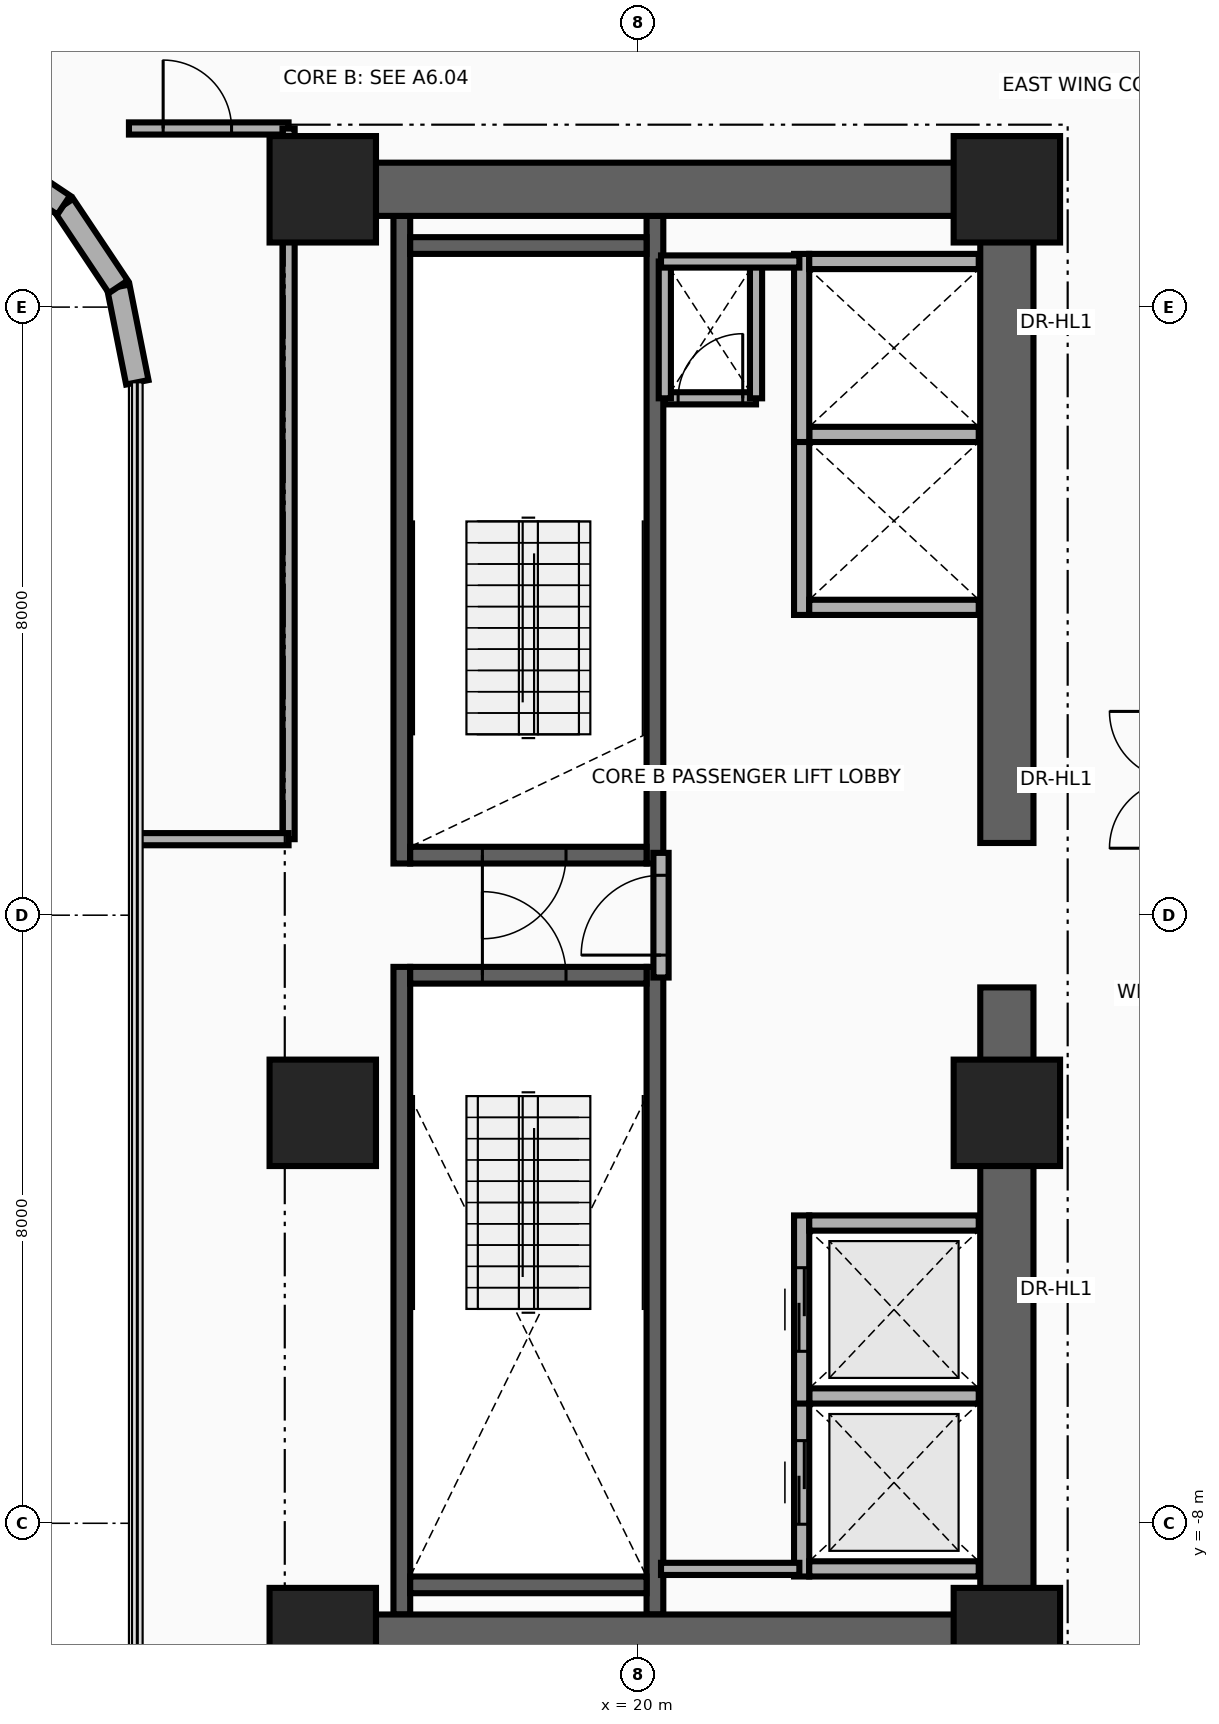
"""IFC4 building model, lengths in metres.
Left out: names, types, materials, properties, quantities, classifications, styles, units other than length and angle.
Written with IfcOpenShell. Run it as: python <this file> out.ifc"""

import sys

from ifc_helpers import new_model, si_unit, direction, frame, frame_2d, origin, origin_2d, place, context, subcontext, project, spatial, rectangle, extrude, source, transform, mapped, element, fill, save


model = new_model("IFC4")
c1 = context("Model", 3, precision=1e-05, world=origin(), true_north=direction((0.0, 1.0)))
c2 = subcontext(c1, "Body", "Model", "MODEL_VIEW")
j1 = project(units=[si_unit("LENGTHUNIT", "METRE"), si_unit("PLANEANGLEUNIT", "RADIAN")], contexts=[c1])
p1 = place(None, origin())
s1 = spatial("IfcSite", under=j1, at=p1, CompositionType="ELEMENT")
p2 = place(p1, origin())
s2 = spatial("IfcBuilding", under=s1, at=p2, CompositionType="ELEMENT")
p3 = place(p2, frame((0.0, 0.0, 44.5)))
s3 = spatial("IfcBuildingStorey", under=s2, at=p3, CompositionType="ELEMENT", Elevation=44.5)
for number, where, z_axis, x_axis in (
    (1, (16.89, 0.68, 0.0), (0.0, 0.0, 1.0), (0.0, 1.0, 0.0)),
    (2, (20.22, 0.68, 0.0), (0.0, 0.0, 1.0), (0.0, 1.0, 0.0)),
):
    element("IfcWall", number, at=place(p3, frame(where, z_axis=z_axis, x_axis=x_axis)), inside=s3, PredefinedType="SHEAR", context=c2, shape_type="SweptSolid", body=[
        extrude(rectangle(XDim=8.52, YDim=0.22, at=frame_2d((4.26, 0.0))), origin(), (0.0, 0.0, 1.0), 3.46),
    ])
p4 = place(p3, frame((17.0, 0.79, 0.0), z_axis=(0.0, 0.0, 1.0), x_axis=(1.0, 0.0, 0.0)))
e3 = element("IfcWall", 3, at=p4, inside=s3, PredefinedType="SHEAR", context=c2, shape_type="SweptSolid", body=[
    extrude(rectangle(XDim=3.11, YDim=0.22, at=frame_2d((1.555, 0.0))), origin(), (0.0, 0.0, 1.0), 3.46),
])
p5 = place(p4, frame((0.95, 0.0, 0.0)))
e4 = element("IfcOpeningElement", 4, at=p5, cuts=e3, PredefinedType="OPENING", context=c2, shape_type="SweptSolid", body=[
    extrude(rectangle(XDim=1.1, YDim=2.15, at=frame_2d((0.55, 1.075))), frame((0.0, 0.125, 0.0), z_axis=(0.0, -1.0, 0.0), x_axis=(1.0, 0.0, 0.0)), (0.0, 0.0, 1.0), 0.25),
])
p6 = place(p3, frame((17.0, 8.81, 0.0), z_axis=(0.0, 0.0, 1.0), x_axis=(1.0, 0.0, 0.0)))
e5 = element("IfcWall", 5, at=p6, inside=s3, PredefinedType="SHEAR", context=c2, shape_type="SweptSolid", body=[
    extrude(rectangle(XDim=3.11, YDim=0.22, at=frame_2d((1.555, 0.0))), origin(), (0.0, 0.0, 1.0), 3.46),
])
for number, where, z_axis, x_axis in (
    (6, (16.89, -9.2, 0.0), (0.0, 0.0, 1.0), (0.0, 1.0, 0.0)),
    (7, (20.22, -9.2, 0.0), (0.0, 0.0, 1.0), (0.0, 1.0, 0.0)),
):
    element("IfcWall", number, at=place(p3, frame(where, z_axis=z_axis, x_axis=x_axis)), inside=s3, PredefinedType="SHEAR", context=c2, shape_type="SweptSolid", body=[
        extrude(rectangle(XDim=8.52, YDim=0.22, at=frame_2d((4.26, 0.0))), origin(), (0.0, 0.0, 1.0), 3.46),
    ])
p7 = place(p3, frame((17.0, -8.81, 0.0), z_axis=(0.0, 0.0, 1.0), x_axis=(1.0, 0.0, 0.0)))
e8 = element("IfcWall", 8, at=p7, inside=s3, PredefinedType="SHEAR", context=c2, shape_type="SweptSolid", body=[
    extrude(rectangle(XDim=3.11, YDim=0.22, at=frame_2d((1.555, 0.0))), origin(), (0.0, 0.0, 1.0), 3.46),
])
p8 = place(p3, frame((17.0, -0.79, 0.0), z_axis=(0.0, 0.0, 1.0), x_axis=(1.0, 0.0, 0.0)))
e9 = element("IfcWall", 9, at=p8, inside=s3, PredefinedType="SHEAR", context=c2, shape_type="SweptSolid", body=[
    extrude(rectangle(XDim=3.11, YDim=0.22, at=frame_2d((1.555, 0.0))), origin(), (0.0, 0.0, 1.0), 3.46),
])
p9 = place(p8, frame((0.95, 0.0, 0.0)))
e10 = element("IfcOpeningElement", 10, at=p9, cuts=e9, PredefinedType="OPENING", context=c2, shape_type="SweptSolid", body=[
    extrude(rectangle(XDim=1.1, YDim=2.15, at=frame_2d((0.55, 1.075))), frame((0.0, 0.125, 0.0), z_axis=(0.0, -1.0, 0.0), x_axis=(1.0, 0.0, 0.0)), (0.0, 0.0, 1.0), 0.25),
])
for number, where, z_axis, x_axis in (
    (11, (24.85, -9.9, 0.0), (0.0, 0.0, 1.0), (0.0, 1.0, 0.0)),
    (12, (24.85, 0.95, 0.0), (0.0, 0.0, 1.0), (0.0, 1.0, 0.0)),
):
    element("IfcWall", number, at=place(p3, frame(where, z_axis=z_axis, x_axis=x_axis)), inside=s3, PredefinedType="SHEAR", context=c2, shape_type="SweptSolid", body=[
        extrude(rectangle(XDim=8.95, YDim=0.7, at=frame_2d((4.475, 0.0))), origin(), (0.0, 0.0, 1.0), 3.46),
    ])
for number, where, z_axis, x_axis in (
    (13, (15.85, 9.55, 0.0), (0.0, 0.0, 1.0), (1.0, 0.0, 0.0)),
    (14, (15.85, -9.55, 0.0), (0.0, 0.0, 1.0), (1.0, 0.0, 0.0)),
):
    element("IfcWall", number, at=place(p3, frame(where, z_axis=z_axis, x_axis=x_axis)), inside=s3, PredefinedType="SHEAR", context=c2, shape_type="SweptSolid", body=[
        extrude(rectangle(XDim=9.0, YDim=0.7, at=frame_2d((4.5, 0.0))), origin(), (0.0, 0.0, 1.0), 3.46),
    ])
m1 = source(origin(), c2, "Body", "SweptSolid", [
    extrude(rectangle(XDim=1.4, YDim=1.4, at=origin_2d()), origin(), (0.0, 0.0, 1.0), 3.7),
])
for number, where, z_axis, x_axis in (
    (15, (15.85, -9.55, 0.0), (0.0, 0.0, 1.0), (1.0, 0.0, 0.0)),
    (16, (24.85, -9.55, 0.0), (0.0, 0.0, 1.0), (1.0, 0.0, 0.0)),
    (17, (15.85, -2.6, 0.0), (0.0, 0.0, 1.0), (1.0, 0.0, 0.0)),
    (18, (24.85, -2.6, 0.0), (0.0, 0.0, 1.0), (1.0, 0.0, 0.0)),
    (19, (15.85, 9.55, 0.0), (0.0, 0.0, 1.0), (1.0, 0.0, 0.0)),
    (20, (24.85, 9.55, 0.0), (0.0, 0.0, 1.0), (1.0, 0.0, 0.0)),
):
    element("IfcColumn", number, at=place(p3, frame(where, z_axis=z_axis, x_axis=x_axis)), inside=s3, PredefinedType="COLUMN", context=c2, shape_type="MappedRepresentation", body=[
        mapped(m1, transform((0.0, 0.0, 0.0), x_axis=(1.0, 0.0, 0.0), y_axis=(0.0, 1.0, 0.0), z_axis=(0.0, 0.0, 1.0), scale=1.0)),
    ])
p10 = place(p3, frame((13.41, 7.011, 0.0), z_axis=(0.0, 0.0, 1.0), x_axis=(-0.195090163074, 0.980785312019, 0.0)))
e21 = element("IfcWall", 21, at=p10, inside=s3, PredefinedType="SOLIDWALL", context=c2, shape_type="SweptSolid", body=[
    extrude(rectangle(XDim=1.281, YDim=0.3, at=frame_2d((0.641, 0.0))), origin(), (0.0, 0.0, 1.0), 3.46),
])
for number, where, z_axis, x_axis in (
    (22, (13.16, 8.268, 0.0), (0.0, 0.0, 1.0), (-0.556, 0.831, 0.0)),
    (23, (12.442, 9.342, 0.0), (0.0, 0.0, 1.0), (-0.831, 0.556, 0.0)),
):
    element("IfcWall", number, at=place(p3, frame(where, z_axis=z_axis, x_axis=x_axis)), inside=s3, PredefinedType="SOLIDWALL", context=c2, shape_type="SweptSolid", body=[
        extrude(rectangle(XDim=1.292, YDim=0.3, at=frame_2d((0.646, 0.0))), origin(), (0.0, 0.0, 1.0), 3.46),
    ])
p11 = place(p3, frame((22.15, -8.7, 0.0), z_axis=(0.0, 0.0, 1.0), x_axis=(0.0, 1.0, 0.0)))
e24 = element("IfcWall", 24, at=p11, inside=s3, PredefinedType="MOVABLE", context=c2, shape_type="SweptSolid", body=[
    extrude(rectangle(XDim=2.475, YDim=0.2, at=frame_2d((1.237, 0.0))), origin(), (0.0, 0.0, 1.0), 3.46),
])
p12 = place(p11, frame((0.688, 0.0, 0.0)))
e25 = element("IfcOpeningElement", 25, at=p12, cuts=e24, PredefinedType="OPENING", context=c2, shape_type="SweptSolid", body=[
    extrude(rectangle(XDim=1.1, YDim=2.1, at=frame_2d((0.55, 1.05))), frame((0.0, 0.115, 0.0), z_axis=(0.0, -1.0, 0.0), x_axis=(1.0, 0.0, 0.0)), (0.0, 0.0, 1.0), 0.23),
])
for number, where, z_axis, x_axis in (
    (26, (22.25, -8.6, 0.0), (0.0, 0.0, 1.0), (1.0, 0.0, 0.0)),
    (27, (22.25, -6.325, 0.0), (0.0, 0.0, 1.0), (1.0, 0.0, 0.0)),
):
    element("IfcWall", number, at=place(p3, frame(where, z_axis=z_axis, x_axis=x_axis)), inside=s3, PredefinedType="MOVABLE", context=c2, shape_type="SweptSolid", body=[
        extrude(rectangle(XDim=2.23, YDim=0.2, at=frame_2d((1.115, 0.0))), origin(), (0.0, 0.0, 1.0), 3.46),
    ])
p13 = place(p3, frame((22.15, -6.425, 0.0), z_axis=(0.0, 0.0, 1.0), x_axis=(0.0, 1.0, 0.0)))
e28 = element("IfcWall", 28, at=p13, inside=s3, PredefinedType="MOVABLE", context=c2, shape_type="SweptSolid", body=[
    extrude(rectangle(XDim=2.475, YDim=0.2, at=frame_2d((1.238, 0.0))), origin(), (0.0, 0.0, 1.0), 3.46),
])
p14 = place(p13, frame((0.688, 0.0, 0.0)))
e29 = element("IfcOpeningElement", 29, at=p14, cuts=e28, PredefinedType="OPENING", context=c2, shape_type="SweptSolid", body=[
    extrude(rectangle(XDim=1.1, YDim=2.1, at=frame_2d((0.55, 1.05))), frame((0.0, 0.115, 0.0), z_axis=(0.0, -1.0, 0.0), x_axis=(1.0, 0.0, 0.0)), (0.0, 0.0, 1.0), 0.23),
])
p15 = place(p3, frame((22.25, -4.05, 0.0), z_axis=(0.0, 0.0, 1.0), x_axis=(1.0, 0.0, 0.0)))
e30 = element("IfcWall", 30, at=p15, inside=s3, PredefinedType="MOVABLE", context=c2, shape_type="SweptSolid", body=[
    extrude(rectangle(XDim=2.23, YDim=0.2, at=frame_2d((1.115, 0.0))), origin(), (0.0, 0.0, 1.0), 3.46),
])
p16 = place(p3, frame((22.15, 3.95, 0.0), z_axis=(0.0, 0.0, 1.0), x_axis=(0.0, 1.0, 0.0)))
e31 = element("IfcWall", 31, at=p16, inside=s3, PredefinedType="MOVABLE", context=c2, shape_type="SweptSolid", body=[
    extrude(rectangle(XDim=2.475, YDim=0.2, at=frame_2d((1.238, 0.0))), origin(), (0.0, 0.0, 1.0), 3.46),
])
for number, where, z_axis, x_axis in (
    (32, (22.25, 4.05, 0.0), (0.0, 0.0, 1.0), (1.0, 0.0, 0.0)),
    (33, (22.25, 6.325, 0.0), (0.0, 0.0, 1.0), (1.0, 0.0, 0.0)),
):
    element("IfcWall", number, at=place(p3, frame(where, z_axis=z_axis, x_axis=x_axis)), inside=s3, PredefinedType="MOVABLE", context=c2, shape_type="SweptSolid", body=[
        extrude(rectangle(XDim=2.23, YDim=0.2, at=frame_2d((1.115, 0.0))), origin(), (0.0, 0.0, 1.0), 2.245),
    ])
p17 = place(p3, frame((22.15, 6.225, 0.0), z_axis=(0.0, 0.0, 1.0), x_axis=(0.0, 1.0, 0.0)))
e34 = element("IfcWall", 34, at=p17, inside=s3, PredefinedType="MOVABLE", context=c2, shape_type="SweptSolid", body=[
    extrude(rectangle(XDim=2.475, YDim=0.2, at=frame_2d((1.237, 0.0))), origin(), (0.0, 0.0, 1.0), 3.46),
])
p18 = place(p3, frame((22.25, 8.6, 0.0), z_axis=(0.0, 0.0, 1.0), x_axis=(1.0, 0.0, 0.0)))
e35 = element("IfcWall", 35, at=p18, inside=s3, PredefinedType="MOVABLE", context=c2, shape_type="SweptSolid", body=[
    extrude(rectangle(XDim=2.23, YDim=0.2, at=frame_2d((1.115, 0.0))), origin(), (0.0, 0.0, 1.0), 2.245),
])
p19 = place(p3, frame((20.3, -0.82, 0.0), z_axis=(0.0, 0.0, 1.0), x_axis=(0.0, 1.0, 0.0)))
e36 = element("IfcWall", 36, at=p19, inside=s3, PredefinedType="PARTITIONING", context=c2, shape_type="SweptSolid", body=[
    extrude(rectangle(XDim=1.64, YDim=0.2, at=frame_2d((0.82, 0.0))), origin(), (0.0, 0.0, 1.0), 3.46),
])
p20 = place(p19, frame((0.295, 0.0, 0.0)))
e37 = element("IfcOpeningElement", 37, at=p20, cuts=e36, PredefinedType="OPENING", context=c2, shape_type="SweptSolid", body=[
    extrude(rectangle(XDim=1.05, YDim=2.15, at=frame_2d((0.525, 1.075))), frame((0.0, 0.115, 0.0), z_axis=(0.0, -1.0, 0.0), x_axis=(1.0, 0.0, 0.0)), (0.0, 0.0, 1.0), 0.23),
])
p21 = place(p3, frame((20.35, 6.8, 0.0), z_axis=(0.0, 0.0, 1.0), x_axis=(1.0, 0.0, 0.0)))
e38 = element("IfcWall", 38, at=p21, inside=s3, PredefinedType="PARTITIONING", context=c2, shape_type="SweptSolid", body=[
    extrude(rectangle(XDim=1.2, YDim=0.16, at=frame_2d((0.6, 0.0))), origin(), (0.0, 0.0, 1.0), 3.46),
])
p22 = place(p21, frame((0.175, 0.0, 0.0)))
e39 = element("IfcOpeningElement", 39, at=p22, cuts=e38, PredefinedType="OPENING", context=c2, shape_type="SweptSolid", body=[
    extrude(rectangle(XDim=0.85, YDim=2.05, at=frame_2d((0.425, 1.025))), frame((0.0, 0.095, 0.0), z_axis=(0.0, -1.0, 0.0), x_axis=(1.0, 0.0, 0.0)), (0.0, 0.0, 1.0), 0.19),
])
for number, where, z_axis, x_axis in (
    (40, (21.55, 6.8, 0.0), (0.0, 0.0, 1.0), (0.0, 1.0, 0.0)),
    (41, (20.35, 6.8, 0.0), (0.0, 0.0, 1.0), (0.0, 1.0, 0.0)),
):
    element("IfcWall", number, at=place(p3, frame(where, z_axis=z_axis, x_axis=x_axis)), inside=s3, PredefinedType="PARTITIONING", context=c2, shape_type="SweptSolid", body=[
        extrude(rectangle(XDim=1.8, YDim=0.16, at=frame_2d((0.9, 0.0))), origin(), (0.0, 0.0, 1.0), 3.46),
    ])
for number, where, z_axis, x_axis in (
    (42, (20.3, -8.6, 0.0), (0.0, 0.0, 1.0), (1.0, 0.0, 0.0)),
    (43, (20.3, 8.6, 0.0), (0.0, 0.0, 1.0), (1.0, 0.0, 0.0)),
):
    element("IfcWall", number, at=place(p3, frame(where, z_axis=z_axis, x_axis=x_axis)), inside=s3, PredefinedType="PARTITIONING", context=c2, shape_type="SweptSolid", body=[
        extrude(rectangle(XDim=1.82, YDim=0.16, at=frame_2d((0.91, 0.0))), origin(), (0.0, 0.0, 1.0), 3.46),
    ])
p23 = place(p3, frame((13.3, 10.35, 0.0), z_axis=(0.0, 0.0, 1.0), x_axis=(1.0, 0.0, 0.0)))
e44 = element("IfcWall", 44, at=p23, inside=s3, PredefinedType="PARTITIONING", context=c2, shape_type="SweptSolid", body=[
    extrude(rectangle(XDim=2.1, YDim=0.16, at=frame_2d((1.05, 0.0))), origin(), (0.0, 0.0, 1.0), 2.583),
])
p24 = place(p23, frame((0.45, 0.0, 0.0)))
e45 = element("IfcOpeningElement", 45, at=p24, cuts=e44, PredefinedType="OPENING", context=c2, shape_type="SweptSolid", body=[
    extrude(rectangle(XDim=0.9, YDim=2.1, at=frame_2d((0.45, 1.05))), frame((0.0, 0.095, 0.0), z_axis=(0.0, -1.0, 0.0), x_axis=(1.0, 0.0, 0.0)), (0.0, 0.0, 1.0), 0.19),
])
p25 = place(p3, frame((15.4, 1.0, 0.0), z_axis=(0.0, 0.0, 1.0), x_axis=(0.0, 1.0, 0.0)))
e46 = element("IfcWall", 46, at=p25, inside=s3, PredefinedType="PARTITIONING", context=c2, shape_type="SweptSolid", body=[
    extrude(rectangle(XDim=9.35, YDim=0.16, at=frame_2d((4.675, 0.0))), origin(), (0.0, 0.0, 1.0), 2.245),
])
p26 = place(p3, frame((13.41, 1.0, 0.0), z_axis=(0.0, 0.0, 1.0), x_axis=(1.0, 0.0, 0.0)))
e47 = element("IfcWall", 47, at=p26, inside=s3, PredefinedType="PARTITIONING", context=c2, shape_type="SweptSolid", body=[
    extrude(rectangle(XDim=1.99, YDim=0.16, at=frame_2d((0.995, 0.0))), origin(), (0.0, 0.0, 1.0), 2.245),
])
p27 = place(p12, origin())
e48 = element("IfcDoor", 48, at=p27, inside=s3, OperationType="DOUBLE_DOOR_SLIDING", PredefinedType="DOOR", context=c2, shape_type="SweptSolid", body=[
    extrude(rectangle(XDim=1.1, YDim=2.1, at=frame_2d((0.55, 1.05))), frame((0.0, 0.025, 0.0), z_axis=(0.0, -1.0, 0.0), x_axis=(1.0, 0.0, 0.0)), (0.0, 0.0, 1.0), 0.05),
])
fill(e25, e48)
p28 = place(p14, origin())
e49 = element("IfcDoor", 49, at=p28, inside=s3, OperationType="DOUBLE_DOOR_SLIDING", PredefinedType="DOOR", context=c2, shape_type="SweptSolid", body=[
    extrude(rectangle(XDim=1.1, YDim=2.1, at=frame_2d((0.55, 1.05))), frame((0.0, 0.025, 0.0), z_axis=(0.0, -1.0, 0.0), x_axis=(1.0, 0.0, 0.0)), (0.0, 0.0, 1.0), 0.05),
])
fill(e29, e49)
p29 = place(p20, origin())
e50 = element("IfcDoor", 50, at=p29, inside=s3, OperationType="SINGLE_SWING_RIGHT", PredefinedType="DOOR", context=c2, shape_type="SweptSolid", body=[
    extrude(rectangle(XDim=1.05, YDim=2.15, at=frame_2d((0.525, 1.075))), frame((0.0, 0.025, 0.0), z_axis=(0.0, -1.0, 0.0), x_axis=(1.0, 0.0, 0.0)), (0.0, 0.0, 1.0), 0.05),
])
fill(e37, e50)
p30 = place(p5, frame((1.1, 0.0, 0.0), z_axis=(0.0, 0.0, 1.0), x_axis=(-1.0, 0.0, 0.0)))
e51 = element("IfcDoor", 51, at=p30, inside=s3, OperationType="SINGLE_SWING_LEFT", PredefinedType="DOOR", context=c2, shape_type="SweptSolid", body=[
    extrude(rectangle(XDim=1.1, YDim=2.15, at=frame_2d((0.55, 1.075))), frame((0.0, 0.025, 0.0), z_axis=(0.0, -1.0, 0.0), x_axis=(1.0, 0.0, 0.0)), (0.0, 0.0, 1.0), 0.05),
])
fill(e4, e51)
p31 = place(p9, origin())
e52 = element("IfcDoor", 52, at=p31, inside=s3, OperationType="SINGLE_SWING_RIGHT", PredefinedType="DOOR", context=c2, shape_type="SweptSolid", body=[
    extrude(rectangle(XDim=1.1, YDim=2.15, at=frame_2d((0.55, 1.075))), frame((0.0, 0.025, 0.0), z_axis=(0.0, -1.0, 0.0), x_axis=(1.0, 0.0, 0.0)), (0.0, 0.0, 1.0), 0.05),
])
fill(e10, e52)
p32 = place(p22, origin())
e53 = element("IfcDoor", 53, at=p32, inside=s3, OperationType="SINGLE_SWING_LEFT", PredefinedType="DOOR", context=c2, shape_type="SweptSolid", body=[
    extrude(rectangle(XDim=0.85, YDim=2.05, at=frame_2d((0.425, 1.025))), frame((0.0, 0.025, 0.0), z_axis=(0.0, -1.0, 0.0), x_axis=(1.0, 0.0, 0.0)), (0.0, 0.0, 1.0), 0.05),
])
fill(e39, e53)
p33 = place(p24, origin())
e54 = element("IfcDoor", 54, at=p33, inside=s3, OperationType="SINGLE_SWING_RIGHT", PredefinedType="DOOR", context=c2, shape_type="SweptSolid", body=[
    extrude(rectangle(XDim=0.9, YDim=2.1, at=frame_2d((0.45, 1.05))), frame((0.0, 0.025, 0.0), z_axis=(0.0, -1.0, 0.0), x_axis=(1.0, 0.0, 0.0)), (0.0, 0.0, 1.0), 0.05),
])
fill(e45, e54)
save(model, sys.argv[1])
